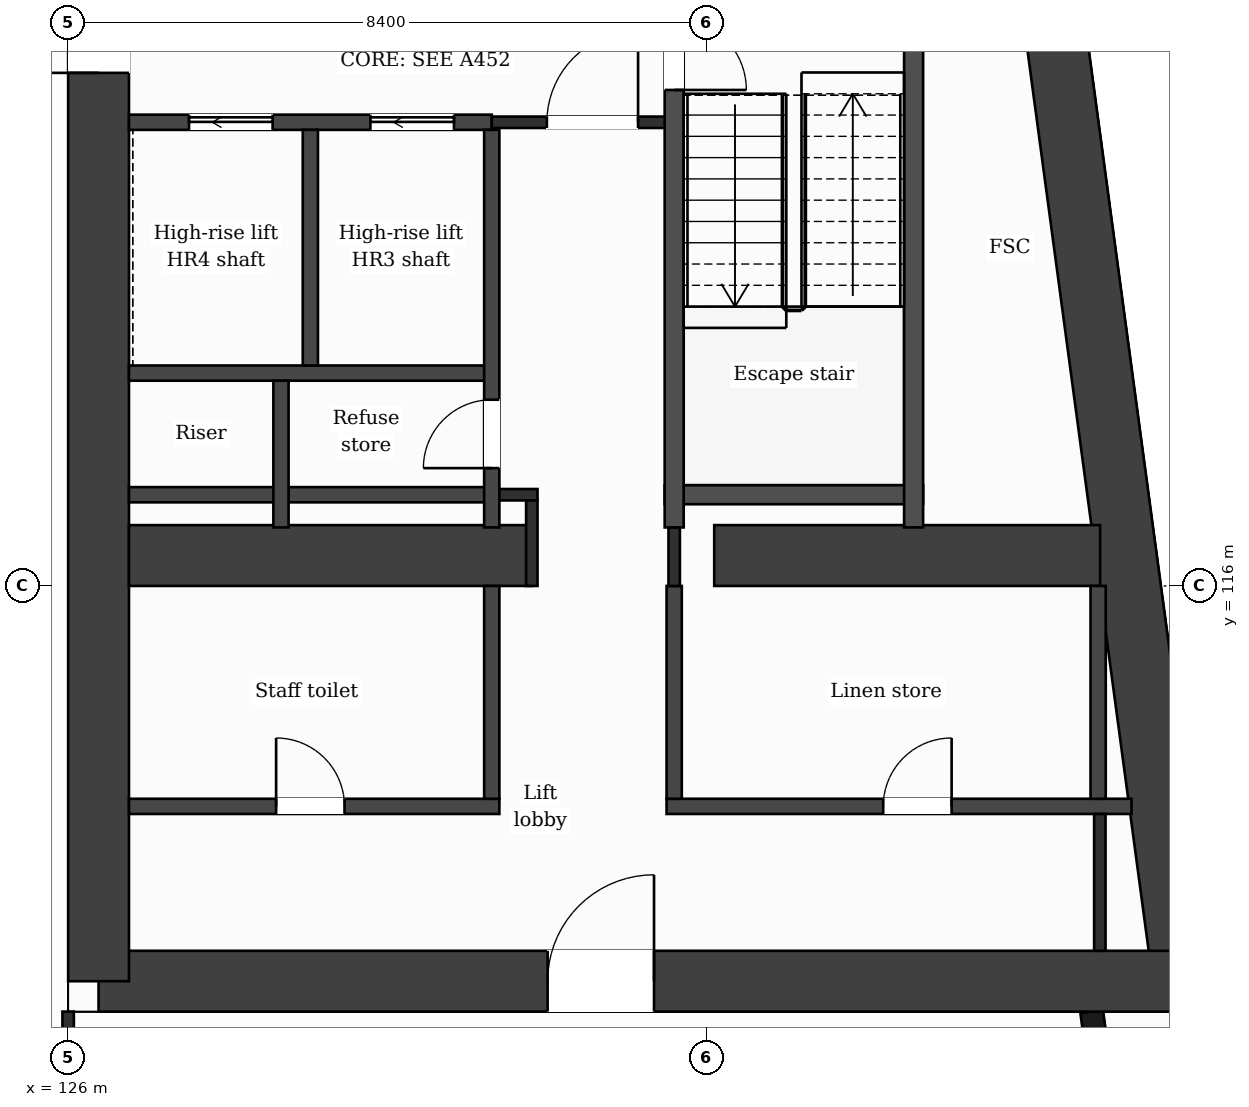
"""IFC4 building model, lengths in metres.
Left out: names, types, materials, properties, quantities, classifications, styles, units other than length and angle.
Written with IfcOpenShell. Run it as: python <this file> out.ifc"""

import sys

from ifc_helpers import new_model, si_unit, direction, frame, frame_2d, origin, place, context, subcontext, project, spatial, rectangle, extrude, element, fill, save


model = new_model("IFC4")
c1 = context("Model", 3, precision=1e-05, world=origin(), true_north=direction((0.0, 1.0)))
c2 = subcontext(c1, "Body", "Model", "MODEL_VIEW")
j1 = project(units=[si_unit("LENGTHUNIT", "METRE"), si_unit("PLANEANGLEUNIT", "RADIAN")], contexts=[c1])
p1 = place(None, origin())
s1 = spatial("IfcSite", under=j1, at=p1, CompositionType="ELEMENT")
p2 = place(p1, origin())
s2 = spatial("IfcBuilding", under=s1, at=p2, CompositionType="ELEMENT")
p3 = place(p2, frame((0.0, 0.0, 213.3)))
s3 = spatial("IfcBuildingStorey", under=s2, at=p3, CompositionType="ELEMENT", Elevation=213.3)
p4 = place(p3, frame((137.82, 132.0, 0.0), z_axis=(0.0, 0.0, 1.0), x_axis=(0.133408347329, -0.991061154956, 0.0)))
e1 = element("IfcWall", 1, at=p4, inside=s3, PredefinedType="SHEAR", context=c2, shape_type="SweptSolid", body=[
    extrude(rectangle(XDim=21.391, YDim=0.8, at=frame_2d((10.696, 0.0))), origin(), (0.0, 0.0, 1.0), 3.7),
])
p5 = place(p3, frame((140.673, 110.8, 0.0), z_axis=(0.0, 0.0, 1.0), x_axis=(-1.0, 0.0, 0.0)))
e2 = element("IfcWall", 2, at=p5, inside=s3, PredefinedType="SHEAR", context=c2, shape_type="SweptSolid", body=[
    extrude(rectangle(XDim=14.273, YDim=0.8, at=frame_2d((7.137, 0.0))), origin(), (0.0, 0.0, 1.0), 3.7),
])
p6 = place(p5, frame((6.965, 0.0, 0.0)))
e3 = element("IfcOpeningElement", 3, at=p6, cuts=e2, PredefinedType="OPENING", context=c2, shape_type="SweptSolid", body=[
    extrude(rectangle(XDim=1.4, YDim=2.1, at=frame_2d((0.7, 1.05))), frame((0.0, 0.41, 0.0), z_axis=(0.0, -1.0, 0.0), x_axis=(1.0, 0.0, 0.0)), (0.0, 0.0, 1.0), 0.82),
])
p7 = place(p3, frame((126.4, 110.8, 0.0), z_axis=(0.0, 0.0, 1.0), x_axis=(0.0, 1.0, 0.0)))
e4 = element("IfcWall", 4, at=p7, inside=s3, PredefinedType="SHEAR", context=c2, shape_type="SweptSolid", body=[
    extrude(rectangle(XDim=21.2, YDim=0.8, at=frame_2d((10.6, 0.0))), origin(), (0.0, 0.0, 1.0), 3.7),
])
p8 = place(p7, frame((11.95, 0.0, 0.0)))
e5 = element("IfcOpeningElement", 5, at=p8, cuts=e4, PredefinedType="OPENING", context=c2, shape_type="SweptSolid", body=[
    extrude(rectangle(XDim=1.4, YDim=2.1, at=frame_2d((0.7, 1.05))), frame((0.0, 0.41, 0.0), z_axis=(0.0, -1.0, 0.0), x_axis=(1.0, 0.0, 0.0)), (0.0, 0.0, 1.0), 0.82),
])
p9 = place(p3, frame((126.8, 116.4, 0.0), z_axis=(0.0, 0.0, 1.0), x_axis=(1.0, 0.0, 0.0)))
e6 = element("IfcWall", 6, at=p9, inside=s3, PredefinedType="SHEAR", context=c2, shape_type="SweptSolid", body=[
    extrude(rectangle(XDim=5.3, YDim=0.8, at=frame_2d((2.65, 0.0))), origin(), (0.0, 0.0, 1.0), 3.7),
])
p10 = place(p3, frame((134.5, 116.4, 0.0), z_axis=(0.0, 0.0, 1.0), x_axis=(1.0, 0.0, 0.0)))
e7 = element("IfcWall", 7, at=p10, inside=s3, PredefinedType="SHEAR", context=c2, shape_type="SweptSolid", body=[
    extrude(rectangle(XDim=5.077, YDim=0.8, at=frame_2d((2.539, 0.0))), origin(), (0.0, 0.0, 1.0), 3.7),
])
p11 = place(p3, frame((140.348, 103.85, 0.0), z_axis=(0.0, 0.0, 1.0), x_axis=(-0.133431549479, 0.991058031401, 0.0)))
e8 = element("IfcWall", 8, at=p11, inside=s3, PredefinedType="SOLIDWALL", context=c2, shape_type="SweptSolid", body=[
    extrude(rectangle(XDim=6.609, YDim=0.3, at=frame_2d((3.304, 0.0))), origin(), (0.0, 0.0, 1.0), 3.38),
])
p12 = place(p11, frame((0.737, 0.0, 0.9)))
e9 = element("IfcOpeningElement", 9, at=p12, cuts=e8, PredefinedType="OPENING", context=c2, shape_type="SweptSolid", body=[
    extrude(rectangle(XDim=1.2, YDim=2.1, at=frame_2d((0.6, 1.05))), frame((0.0, 0.16, 0.0), z_axis=(0.0, -1.0, 0.0), x_axis=(1.0, 0.0, 0.0)), (0.0, 0.0, 1.0), 0.32),
])
p13 = place(p11, frame((3.991, 0.0, 0.0)))
e10 = element("IfcOpeningElement", 10, at=p13, cuts=e8, PredefinedType="OPENING", context=c2, shape_type="SweptSolid", body=[
    extrude(rectangle(XDim=1.2, YDim=2.4, at=frame_2d((0.6, 1.2))), frame((0.0, 0.16, 0.0), z_axis=(0.0, -1.0, 0.0), x_axis=(1.0, 0.0, 0.0)), (0.0, 0.0, 1.0), 0.32),
])
p14 = place(p3, frame((126.8, 113.1, 0.0), z_axis=(0.0, 0.0, 1.0), x_axis=(1.0, 0.0, 0.0)))
e11 = element("IfcWall", 11, at=p14, inside=s3, PredefinedType="PARTITIONING", context=c2, shape_type="SweptSolid", body=[
    extrude(rectangle(XDim=4.873, YDim=0.2, at=frame_2d((2.437, 0.0))), origin(), (0.0, 0.0, 1.0), 3.38),
])
p15 = place(p14, frame((1.936, 0.0, 0.0)))
e12 = element("IfcOpeningElement", 12, at=p15, cuts=e11, PredefinedType="OPENING", context=c2, shape_type="SweptSolid", body=[
    extrude(rectangle(XDim=0.9, YDim=2.1, at=frame_2d((0.45, 1.05))), frame((0.0, 0.11, 0.0), z_axis=(0.0, -1.0, 0.0), x_axis=(1.0, 0.0, 0.0)), (0.0, 0.0, 1.0), 0.22),
])
p16 = place(p3, frame((133.873, 113.1, 0.0), z_axis=(0.0, 0.0, 1.0), x_axis=(1.0, 0.0, 0.0)))
e13 = element("IfcWall", 13, at=p16, inside=s3, PredefinedType="PARTITIONING", context=c2, shape_type="SweptSolid", body=[
    extrude(rectangle(XDim=6.117, YDim=0.2, at=frame_2d((3.059, 0.0))), origin(), (0.0, 0.0, 1.0), 3.38),
])
p17 = place(p16, frame((2.85, 0.0, 0.0)))
e14 = element("IfcOpeningElement", 14, at=p17, cuts=e13, PredefinedType="OPENING", context=c2, shape_type="SweptSolid", body=[
    extrude(rectangle(XDim=0.9, YDim=2.1, at=frame_2d((0.45, 1.05))), frame((0.0, 0.11, 0.0), z_axis=(0.0, -1.0, 0.0), x_axis=(1.0, 0.0, 0.0)), (0.0, 0.0, 1.0), 0.22),
])
p18 = place(p3, frame((126.8, 117.2, 0.0), z_axis=(0.0, 0.0, 1.0), x_axis=(1.0, 0.0, 0.0)))
e15 = element("IfcWall", 15, at=p18, inside=s3, PredefinedType="PARTITIONING", context=c2, shape_type="SweptSolid", body=[
    extrude(rectangle(XDim=4.773, YDim=0.2, at=frame_2d((2.386, 0.0))), origin(), (0.0, 0.0, 1.0), 3.38),
])
p19 = place(p3, frame((131.573, 117.2, 0.0), z_axis=(0.0, 0.0, 1.0), x_axis=(1.0, 0.0, 0.0)))
e16 = element("IfcWall", 16, at=p19, inside=s3, PredefinedType="PARTITIONING", context=c2, shape_type="SweptSolid", body=[
    extrude(rectangle(XDim=0.602, YDim=0.15, at=frame_2d((0.301, 0.0))), origin(), (0.0, 0.0, 1.0), 3.38),
])
p20 = place(p3, frame((133.848, 117.2, 0.0), z_axis=(0.0, 0.0, 1.0), x_axis=(1.0, 0.0, 0.0)))
e17 = element("IfcWall", 17, at=p20, inside=s3, PredefinedType="PARTITIONING", context=c2, shape_type="SweptSolid", body=[
    extrude(rectangle(XDim=3.4, YDim=0.25, at=frame_2d((1.7, 0.0))), origin(), (0.0, 0.0, 1.0), 3.38),
])
p21 = place(p3, frame((126.8, 118.8, 0.0), z_axis=(0.0, 0.0, 1.0), x_axis=(1.0, 0.0, 0.0)))
e18 = element("IfcWall", 18, at=p21, inside=s3, PredefinedType="PARTITIONING", context=c2, shape_type="SweptSolid", body=[
    extrude(rectangle(XDim=4.773, YDim=0.2, at=frame_2d((2.386, 0.0))), origin(), (0.0, 0.0, 1.0), 3.38),
])
p22 = place(p3, frame((126.8, 122.1, 0.0), z_axis=(0.0, 0.0, 1.0), x_axis=(1.0, 0.0, 0.0)))
e19 = element("IfcWall", 19, at=p22, inside=s3, PredefinedType="PARTITIONING", context=c2, shape_type="SweptSolid", body=[
    extrude(rectangle(XDim=4.773, YDim=0.2, at=frame_2d((2.386, 0.0))), origin(), (0.0, 0.0, 1.0), 3.38),
])
p23 = place(p22, frame((3.176, 0.0, 0.0)))
e20 = element("IfcOpeningElement", 20, at=p23, cuts=e19, PredefinedType="OPENING", context=c2, shape_type="SweptSolid", body=[
    extrude(rectangle(XDim=1.1, YDim=2.1, at=frame_2d((0.55, 1.05))), frame((0.0, 0.11, 0.0), z_axis=(0.0, -1.0, 0.0), x_axis=(1.0, 0.0, 0.0)), (0.0, 0.0, 1.0), 0.22),
])
p24 = place(p22, frame((0.79, 0.0, 0.0)))
e21 = element("IfcOpeningElement", 21, at=p24, cuts=e19, PredefinedType="OPENING", context=c2, shape_type="SweptSolid", body=[
    extrude(rectangle(XDim=1.1, YDim=2.1, at=frame_2d((0.55, 1.05))), frame((0.0, 0.11, 0.0), z_axis=(0.0, -1.0, 0.0), x_axis=(1.0, 0.0, 0.0)), (0.0, 0.0, 1.0), 0.22),
])
p25 = place(p3, frame((131.573, 122.1, 0.0), z_axis=(0.0, 0.0, 1.0), x_axis=(1.0, 0.0, 0.0)))
e22 = element("IfcWall", 22, at=p25, inside=s3, PredefinedType="PARTITIONING", context=c2, shape_type="SweptSolid", body=[
    extrude(rectangle(XDim=2.4, YDim=0.15, at=frame_2d((1.2, 0.0))), origin(), (0.0, 0.0, 1.0), 3.38),
])
p26 = place(p25, frame((0.725, 0.0, 0.0)))
e23 = element("IfcOpeningElement", 23, at=p26, cuts=e22, PredefinedType="OPENING", context=c2, shape_type="SweptSolid", body=[
    extrude(rectangle(XDim=1.2, YDim=2.1, at=frame_2d((0.6, 1.05))), frame((0.0, 0.085, 0.0), z_axis=(0.0, -1.0, 0.0), x_axis=(1.0, 0.0, 0.0)), (0.0, 0.0, 1.0), 0.17),
])
p27 = place(p3, frame((126.0, 109.075, 0.0), z_axis=(0.0, 0.0, 1.0), x_axis=(0.0, 1.0, 0.0)))
e24 = element("IfcWall", 24, at=p27, inside=s3, PredefinedType="PARTITIONING", context=c2, shape_type="SweptSolid", body=[
    extrude(rectangle(XDim=1.325, YDim=0.15, at=frame_2d((0.663, 0.0))), origin(), (0.0, 0.0, 1.0), 3.38),
])
p28 = place(p3, frame((128.8, 116.77, 0.0), z_axis=(0.0, 0.0, 1.0), x_axis=(0.0, 1.0, 0.0)))
e25 = element("IfcWall", 25, at=p28, inside=s3, PredefinedType="PARTITIONING", context=c2, shape_type="SweptSolid", body=[
    extrude(rectangle(XDim=1.93, YDim=0.2, at=frame_2d((0.965, 0.0))), origin(), (0.0, 0.0, 1.0), 3.38),
])
p29 = place(p3, frame((129.187, 118.9, 0.0), z_axis=(0.0, 0.0, 1.0), x_axis=(0.0, 1.0, 0.0)))
e26 = element("IfcWall", 26, at=p29, inside=s3, PredefinedType="PARTITIONING", context=c2, shape_type="SweptSolid", body=[
    extrude(rectangle(XDim=3.1, YDim=0.2, at=frame_2d((1.55, 0.0))), origin(), (0.0, 0.0, 1.0), 3.38),
])
p30 = place(p3, frame((131.573, 113.2, 0.0), z_axis=(0.0, 0.0, 1.0), x_axis=(0.0, 1.0, 0.0)))
e27 = element("IfcWall", 27, at=p30, inside=s3, PredefinedType="PARTITIONING", context=c2, shape_type="SweptSolid", body=[
    extrude(rectangle(XDim=2.8, YDim=0.2, at=frame_2d((1.4, 0.0))), origin(), (0.0, 0.0, 1.0), 3.38),
])
p31 = place(p3, frame((131.573, 116.77, 0.0), z_axis=(0.0, 0.0, 1.0), x_axis=(0.0, 1.0, 0.0)))
e28 = element("IfcWall", 28, at=p31, inside=s3, PredefinedType="PARTITIONING", context=c2, shape_type="SweptSolid", body=[
    extrude(rectangle(XDim=5.23, YDim=0.2, at=frame_2d((2.615, 0.0))), origin(), (0.0, 0.0, 1.0), 3.38),
])
p32 = place(p31, frame((0.78, 0.0, 0.0)))
e29 = element("IfcOpeningElement", 29, at=p32, cuts=e28, PredefinedType="OPENING", context=c2, shape_type="SweptSolid", body=[
    extrude(rectangle(XDim=0.9, YDim=2.1, at=frame_2d((0.45, 1.05))), frame((0.0, 0.11, 0.0), z_axis=(0.0, -1.0, 0.0), x_axis=(1.0, 0.0, 0.0)), (0.0, 0.0, 1.0), 0.22),
])
p33 = place(p3, frame((132.1, 116.0, 0.0), z_axis=(0.0, 0.0, 1.0), x_axis=(0.0, 1.0, 0.0)))
e30 = element("IfcWall", 30, at=p33, inside=s3, PredefinedType="PARTITIONING", context=c2, shape_type="SweptSolid", body=[
    extrude(rectangle(XDim=1.125, YDim=0.15, at=frame_2d((0.562, 0.0))), origin(), (0.0, 0.0, 1.0), 3.38),
])
p34 = place(p3, frame((133.973, 113.2, 0.0), z_axis=(0.0, 0.0, 1.0), x_axis=(0.0, 1.0, 0.0)))
e31 = element("IfcWall", 31, at=p34, inside=s3, PredefinedType="PARTITIONING", context=c2, shape_type="SweptSolid", body=[
    extrude(rectangle(XDim=2.8, YDim=0.2, at=frame_2d((1.4, 0.0))), origin(), (0.0, 0.0, 1.0), 3.38),
])
p35 = place(p3, frame((133.973, 116.0, 0.0), z_axis=(0.0, 0.0, 1.0), x_axis=(0.0, 1.0, 0.0)))
e32 = element("IfcWall", 32, at=p35, inside=s3, PredefinedType="PARTITIONING", context=c2, shape_type="SweptSolid", body=[
    extrude(rectangle(XDim=0.77, YDim=0.15, at=frame_2d((0.385, 0.0))), origin(), (0.0, 0.0, 1.0), 3.38),
])
p36 = place(p3, frame((133.973, 116.77, 0.0), z_axis=(0.0, 0.0, 1.0), x_axis=(0.0, 1.0, 0.0)))
e33 = element("IfcWall", 33, at=p36, inside=s3, PredefinedType="PARTITIONING", context=c2, shape_type="SweptSolid", body=[
    extrude(rectangle(XDim=7.055, YDim=0.25, at=frame_2d((3.527, 0.0))), origin(), (0.0, 0.0, 1.0), 3.38),
])
p37 = place(p36, frame((5.755, 0.0, 0.0)))
e34 = element("IfcOpeningElement", 34, at=p37, cuts=e33, PredefinedType="OPENING", context=c2, shape_type="SweptSolid", body=[
    extrude(rectangle(XDim=0.95, YDim=2.1, at=frame_2d((0.475, 1.05))), frame((0.0, 0.135, 0.0), z_axis=(0.0, -1.0, 0.0), x_axis=(1.0, 0.0, 0.0)), (0.0, 0.0, 1.0), 0.27),
])
p38 = place(p3, frame((137.123, 116.77, 0.0), z_axis=(0.0, 0.0, 1.0), x_axis=(0.0, 1.0, 0.0)))
e35 = element("IfcWall", 35, at=p38, inside=s3, PredefinedType="PARTITIONING", context=c2, shape_type="SweptSolid", body=[
    extrude(rectangle(XDim=7.055, YDim=0.25, at=frame_2d((3.527, 0.0))), origin(), (0.0, 0.0, 1.0), 3.38),
])
p39 = place(p3, frame((139.551, 113.2, 0.0), z_axis=(0.0, 0.0, 1.0), x_axis=(0.0, 1.0, 0.0)))
e36 = element("IfcWall", 36, at=p39, inside=s3, PredefinedType="PARTITIONING", context=c2, shape_type="SweptSolid", body=[
    extrude(rectangle(XDim=2.8, YDim=0.2, at=frame_2d((1.4, 0.0))), origin(), (0.0, 0.0, 1.0), 3.38),
])
p40 = place(p3, frame((139.573, 111.2, 0.0), z_axis=(0.0, 0.0, 1.0), x_axis=(0.0, 1.0, 0.0)))
e37 = element("IfcWall", 37, at=p40, inside=s3, PredefinedType="PARTITIONING", context=c2, shape_type="SweptSolid", body=[
    extrude(rectangle(XDim=1.8, YDim=0.15, at=frame_2d((0.9, 0.0))), origin(), (0.0, 0.0, 1.0), 3.38),
])
p41 = place(p26, origin())
e38 = element("IfcDoor", 38, at=p41, inside=s3, OperationType="SINGLE_SWING_RIGHT", PredefinedType="DOOR", context=c2, shape_type="SweptSolid", body=[
    extrude(rectangle(XDim=1.2, YDim=2.1, at=frame_2d((0.6, 1.05))), frame((0.0, 0.025, 0.0), z_axis=(0.0, -1.0, 0.0), x_axis=(1.0, 0.0, 0.0)), (0.0, 0.0, 1.0), 0.05),
])
fill(e23, e38)
p42 = place(p23, origin())
e39 = element("IfcDoor", 39, at=p42, inside=s3, OperationType="SLIDING_TO_LEFT", PredefinedType="DOOR", context=c2, shape_type="SweptSolid", body=[
    extrude(rectangle(XDim=1.1, YDim=2.1, at=frame_2d((0.55, 1.05))), frame((0.0, 0.025, 0.0), z_axis=(0.0, -1.0, 0.0), x_axis=(1.0, 0.0, 0.0)), (0.0, 0.0, 1.0), 0.05),
])
fill(e20, e39)
p43 = place(p24, origin())
e40 = element("IfcDoor", 40, at=p43, inside=s3, OperationType="SLIDING_TO_LEFT", PredefinedType="DOOR", context=c2, shape_type="SweptSolid", body=[
    extrude(rectangle(XDim=1.1, YDim=2.1, at=frame_2d((0.55, 1.05))), frame((0.0, 0.025, 0.0), z_axis=(0.0, -1.0, 0.0), x_axis=(1.0, 0.0, 0.0)), (0.0, 0.0, 1.0), 0.05),
])
fill(e21, e40)
p44 = place(p37, origin())
e41 = element("IfcDoor", 41, at=p44, inside=s3, OperationType="SINGLE_SWING_LEFT", PredefinedType="DOOR", context=c2, shape_type="SweptSolid", body=[
    extrude(rectangle(XDim=0.95, YDim=2.1, at=frame_2d((0.475, 1.05))), frame((0.0, 0.025, 0.0), z_axis=(0.0, -1.0, 0.0), x_axis=(1.0, 0.0, 0.0)), (0.0, 0.0, 1.0), 0.05),
])
fill(e34, e41)
p45 = place(p32, origin())
e42 = element("IfcDoor", 42, at=p45, inside=s3, OperationType="SINGLE_SWING_LEFT", PredefinedType="DOOR", context=c2, shape_type="SweptSolid", body=[
    extrude(rectangle(XDim=0.9, YDim=2.1, at=frame_2d((0.45, 1.05))), frame((0.0, 0.025, 0.0), z_axis=(0.0, -1.0, 0.0), x_axis=(1.0, 0.0, 0.0)), (0.0, 0.0, 1.0), 0.05),
])
fill(e29, e42)
p46 = place(p17, origin())
e43 = element("IfcDoor", 43, at=p46, inside=s3, OperationType="SINGLE_SWING_RIGHT", PredefinedType="DOOR", context=c2, shape_type="SweptSolid", body=[
    extrude(rectangle(XDim=0.9, YDim=2.1, at=frame_2d((0.45, 1.05))), frame((0.0, 0.025, 0.0), z_axis=(0.0, -1.0, 0.0), x_axis=(1.0, 0.0, 0.0)), (0.0, 0.0, 1.0), 0.05),
])
fill(e14, e43)
p47 = place(p15, origin())
e44 = element("IfcDoor", 44, at=p47, inside=s3, OperationType="SINGLE_SWING_LEFT", PredefinedType="DOOR", context=c2, shape_type="SweptSolid", body=[
    extrude(rectangle(XDim=0.9, YDim=2.1, at=frame_2d((0.45, 1.05))), frame((0.0, 0.025, 0.0), z_axis=(0.0, -1.0, 0.0), x_axis=(1.0, 0.0, 0.0)), (0.0, 0.0, 1.0), 0.05),
])
fill(e12, e44)
p48 = place(p6, origin())
e45 = element("IfcDoor", 45, at=p48, inside=s3, OperationType="SINGLE_SWING_LEFT", PredefinedType="DOOR", context=c2, shape_type="SweptSolid", body=[
    extrude(rectangle(XDim=1.4, YDim=2.1, at=frame_2d((0.7, 1.05))), frame((0.0, 0.025, 0.0), z_axis=(0.0, -1.0, 0.0), x_axis=(1.0, 0.0, 0.0)), (0.0, 0.0, 1.0), 0.05),
])
fill(e3, e45)
p49 = place(p8, origin())
e46 = element("IfcDoor", 46, at=p49, inside=s3, OperationType="SINGLE_SWING_LEFT", PredefinedType="DOOR", context=c2, shape_type="SweptSolid", body=[
    extrude(rectangle(XDim=1.4, YDim=2.1, at=frame_2d((0.7, 1.05))), frame((0.0, 0.025, 0.0), z_axis=(0.0, -1.0, 0.0), x_axis=(1.0, 0.0, 0.0)), (0.0, 0.0, 1.0), 0.05),
])
fill(e5, e46)
save(model, sys.argv[1])
